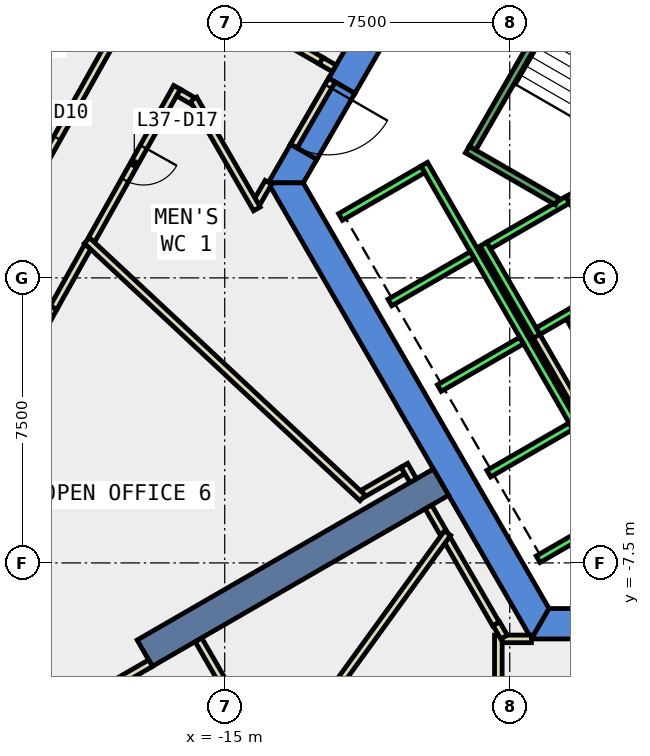
"""IFC4 building model, lengths in metres.
Left out: names, types, materials, properties, quantities, classifications, styles, units other than length and angle.
Written with IfcOpenShell. Run it as: python <this file> out.ifc"""

import sys

from ifc_helpers import new_model, si_unit, direction, frame, frame_2d, origin, place, context, subcontext, project, spatial, polyline, rectangle, outline, extrude, element, fill, save


model = new_model("IFC4")
c1 = context("Model", 3, precision=1e-05, world=origin(), true_north=direction((0.0, 1.0)))
c2 = subcontext(c1, "Body", "Model", "MODEL_VIEW")
j1 = project(units=[si_unit("LENGTHUNIT", "METRE"), si_unit("PLANEANGLEUNIT", "RADIAN")], contexts=[c1])
p1 = place(None, origin())
s1 = spatial("IfcSite", under=j1, at=p1, CompositionType="ELEMENT")
p2 = place(p1, origin())
s2 = spatial("IfcBuilding", under=s1, at=p2, CompositionType="ELEMENT")
p3 = place(p2, frame((0.0, 0.0, 167.6)))
s3 = spatial("IfcBuildingStorey", under=s2, at=p3, CompositionType="ELEMENT", Elevation=167.6)
p4 = place(p3, frame((0.0, 0.0, -0.4)))
e1 = element("IfcWall", 1, at=p4, inside=s3, PredefinedType="SHEAR", context=c2, shape_type="SweptSolid", body=[
    extrude(outline(polyline([(-12.267, 5.252), (-11.575, 4.852), (-6.466, 13.7), (-6.928, 14.5), (-12.267, 5.252)])), origin(), (0.0, 0.0, 1.0), 4.2),
])
p5 = place(p3, frame((0.0, 0.0, -0.4)))
e2 = element("IfcWall", 2, at=p5, inside=s3, PredefinedType="SHEAR", context=c2, shape_type="SweptSolid", body=[
    extrude(outline(polyline([(-12.575, 3.12), (-13.267, 3.52), (-13.856, 2.5), (-12.933, 2.5), (-12.575, 3.12)])), origin(), (0.0, 0.0, 1.0), 4.2),
])
p6 = place(p3, frame((0.0, 0.0, 3.6)))
e3 = element("IfcWall", 3, at=p6, inside=s3, PredefinedType="SHEAR", context=c2, shape_type="SweptSolid", body=[
    extrude(outline(polyline([(-13.267, 3.52), (-12.575, 3.12), (-11.575, 4.852), (-12.267, 5.252), (-13.267, 3.52)])), origin(), (0.0, 0.0, 1.0), 0.2),
])
p7 = place(p3, frame((0.0, 0.0, -0.4)))
e4 = element("IfcWall", 4, at=p7, inside=s3, PredefinedType="SHEAR", context=c2, shape_type="SweptSolid", body=[
    extrude(outline(polyline([(-13.856, 2.5), (-6.928, -9.5), (-6.466, -8.7), (-12.933, 2.5), (-13.856, 2.5)])), origin(), (0.0, 0.0, 1.0), 4.2),
])
p8 = place(p3, frame((0.0, 0.0, -0.4)))
e5 = element("IfcWall", 5, at=p8, inside=s3, PredefinedType="SHEAR", context=c2, shape_type="SweptSolid", body=[
    extrude(outline(polyline([(3.75, -9.5), (3.75, -8.7), (-6.466, -8.7), (-6.928, -9.5), (3.75, -9.5)])), origin(), (0.0, 0.0, 1.0), 4.2),
])
p9 = place(p3, frame((-9.31, -5.375, -0.4), z_axis=(0.0, 0.0, 1.0), x_axis=(-0.866017533419, -0.500013631625, 0.0)))
e6 = element("IfcWall", 6, at=p9, inside=s3, PredefinedType="SHEAR", context=c2, shape_type="SweptSolid", body=[
    extrude(rectangle(XDim=9.0, YDim=0.8, at=frame_2d((4.5, 0.0))), origin(), (0.0, 0.0, 1.0), 4.2),
])
p10 = place(p3, frame((-14.922, 7.131, 0.0), z_axis=(0.0, 0.0, 1.0), x_axis=(0.866124025492, -0.499829143273, 0.0)))
e7 = element("IfcWall", 7, at=p10, inside=s3, PredefinedType="PARTITIONING", context=c2, shape_type="SweptSolid", body=[
    extrude(rectangle(XDim=2.839, YDim=0.2, at=frame_2d((1.42, 0.0))), origin(), (0.0, 0.0, 1.0), 3.8),
])
p11 = place(p3, frame((-13.85, 2.514, 0.0), z_axis=(0.0, 0.0, 1.0), x_axis=(-0.500418219013, -0.865783810244, 0.0)))
e8 = element("IfcWall", 8, at=p11, inside=s3, PredefinedType="PARTITIONING", context=c2, shape_type="SweptSolid", body=[
    extrude(rectangle(XDim=0.607, YDim=0.2, at=frame_2d((0.304, 0.0))), origin(), (0.0, 0.0, 1.0), 3.8),
])
p12 = place(p3, frame((-14.154, 1.815, 0.0), z_axis=(0.0, 0.0, 1.0), x_axis=(-0.500038857296, 0.866002968352, 0.0)))
e9 = element("IfcWall", 9, at=p12, inside=s3, PredefinedType="PARTITIONING", context=c2, shape_type="SweptSolid", body=[
    extrude(rectangle(XDim=3.34, YDim=0.2, at=frame_2d((1.67, 0.0))), origin(), (0.0, 0.0, 1.0), 3.8),
])
p13 = place(p3, frame((-15.86, 4.671, 0.0), z_axis=(0.0, 0.0, 1.0), x_axis=(-0.866047486323, 0.49996174997, 0.0)))
e10 = element("IfcWall", 10, at=p13, inside=s3, PredefinedType="PARTITIONING", context=c2, shape_type="SweptSolid", body=[
    extrude(rectangle(XDim=0.412, YDim=0.2, at=frame_2d((0.206, 0.0))), origin(), (0.0, 0.0, 1.0), 3.8),
])
p14 = place(p3, frame((-16.255, 5.014, 0.0), z_axis=(0.0, 0.0, 1.0), x_axis=(-0.488988017817, -0.87229050117, 0.0)))
e11 = element("IfcWall", 11, at=p14, inside=s3, PredefinedType="PARTITIONING", context=c2, shape_type="SweptSolid", body=[
    extrude(rectangle(XDim=4.599, YDim=0.2, at=frame_2d((2.3, 0.0))), origin(), (0.0, 0.0, 1.0), 3.8),
])
p15 = place(p14, frame((1.8, 0.0, 0.0)))
e12 = element("IfcOpeningElement", 12, at=p15, cuts=e11, PredefinedType="OPENING", context=c2, shape_type="SweptSolid", body=[
    extrude(rectangle(XDim=1.0, YDim=2.1, at=frame_2d((0.5, 1.05))), frame((0.0, 0.11, 0.0), z_axis=(0.0, -1.0, 0.0), x_axis=(1.0, 0.0, 0.0)), (0.0, 0.0, 1.0), 0.22),
])
p16 = place(p3, frame((-18.602, 0.828, 0.0), z_axis=(0.0, 0.0, 1.0), x_axis=(-0.488969229043, -0.872301033502, 0.0)))
e13 = element("IfcWall", 13, at=p16, inside=s3, PredefinedType="PARTITIONING", context=c2, shape_type="SweptSolid", body=[
    extrude(rectangle(XDim=1.849, YDim=0.2, at=frame_2d((0.924, 0.0))), origin(), (0.0, 0.0, 1.0), 3.8),
])
p17 = place(p3, frame((-19.506, -0.785, 0.0), z_axis=(0.0, 0.0, 1.0), x_axis=(-0.477513909405, -0.878624189472, 0.0)))
e14 = element("IfcWall", 14, at=p17, inside=s3, PredefinedType="PARTITIONING", context=c2, shape_type="SweptSolid", body=[
    extrude(rectangle(XDim=6.956, YDim=0.2, at=frame_2d((3.478, 0.0))), origin(), (0.0, 0.0, 1.0), 3.8),
])
p18 = place(p17, frame((2.978, 0.0, 0.0)))
e15 = element("IfcOpeningElement", 15, at=p18, cuts=e14, PredefinedType="OPENING", context=c2, shape_type="SweptSolid", body=[
    extrude(rectangle(XDim=1.0, YDim=2.1, at=frame_2d((0.5, 1.05))), frame((0.0, 0.11, 0.0), z_axis=(0.0, -1.0, 0.0), x_axis=(1.0, 0.0, 0.0)), (0.0, 0.0, 1.0), 0.22),
])
p19 = place(p3, frame((-21.381, 0.165, 0.0), z_axis=(0.0, 0.0, 1.0), x_axis=(0.489014139272, 0.872275857509, 0.0)))
e16 = element("IfcWall", 16, at=p19, inside=s3, PredefinedType="PARTITIONING", context=c2, shape_type="SweptSolid", body=[
    extrude(rectangle(XDim=7.057, YDim=0.2, at=frame_2d((3.529, 0.0))), origin(), (0.0, 0.0, 1.0), 3.8),
])
p20 = place(p19, frame((3.029, 0.0, 0.0)))
e17 = element("IfcOpeningElement", 17, at=p20, cuts=e16, PredefinedType="OPENING", context=c2, shape_type="SweptSolid", body=[
    extrude(rectangle(XDim=1.0, YDim=2.1, at=frame_2d((0.5, 1.05))), frame((0.0, 0.11, 0.0), z_axis=(0.0, -1.0, 0.0), x_axis=(1.0, 0.0, 0.0)), (0.0, 0.0, 1.0), 0.22),
])
p21 = place(p3, frame((-5.126, -2.422, 0.0), z_axis=(0.0, 0.0, 1.0), x_axis=(-0.500062241894, 0.865989465428, 0.0)))
e18 = element("IfcWall", 18, at=p21, inside=s3, PredefinedType="PARTITIONING", context=c2, shape_type="SweptSolid", body=[
    extrude(rectangle(XDim=1.7, YDim=0.2, at=frame_2d((0.85, 0.0))), origin(), (0.0, 0.0, 1.0), 3.8),
])
p22 = place(p3, frame((-5.492, -3.788, 0.0), z_axis=(0.0, 0.0, 1.0), x_axis=(-0.500008949224, 0.866020236886, 0.0)))
e19 = element("IfcWall", 19, at=p22, inside=s3, PredefinedType="PARTITIONING", context=c2, shape_type="SweptSolid", body=[
    extrude(rectangle(XDim=2.68, YDim=0.2, at=frame_2d((1.34, 0.0))), origin(), (0.0, 0.0, 1.0), 3.8),
])
p23 = place(p3, frame((-7.722, -9.499, 0.0), z_axis=(0.0, 0.0, 1.0), x_axis=(1.0, 0.0, 0.0)))
e20 = element("IfcWall", 20, at=p23, inside=s3, PredefinedType="PARTITIONING", context=c2, shape_type="SweptSolid", body=[
    extrude(rectangle(XDim=0.793, YDim=0.2, at=frame_2d((0.396, 0.0))), origin(), (0.0, 0.0, 1.0), 3.8),
])
p24 = place(p3, frame((-7.8, -17.171, 0.0), z_axis=(0.0, 0.0, 1.0), x_axis=(0.0, 1.0, 0.0)))
e21 = element("IfcWall", 21, at=p24, inside=s3, PredefinedType="PARTITIONING", context=c2, shape_type="SweptSolid", body=[
    extrude(rectangle(XDim=7.772, YDim=0.2, at=frame_2d((3.886, 0.0))), origin(), (0.0, 0.0, 1.0), 3.8),
])
p25 = place(p24, frame((3.386, 0.0, 0.0)))
e22 = element("IfcOpeningElement", 22, at=p25, cuts=e21, PredefinedType="OPENING", context=c2, shape_type="SweptSolid", body=[
    extrude(rectangle(XDim=1.0, YDim=2.1, at=frame_2d((0.5, 1.05))), frame((0.0, 0.11, 0.0), z_axis=(0.0, -1.0, 0.0), x_axis=(1.0, 0.0, 0.0)), (0.0, 0.0, 1.0), 0.22),
])
p26 = place(p3, frame((-7.862, -9.107, 0.0), z_axis=(0.0, 0.0, 1.0), x_axis=(-0.499994038704, 0.866028845513, 0.0)))
e23 = element("IfcWall", 23, at=p26, inside=s3, PredefinedType="PARTITIONING", context=c2, shape_type="SweptSolid", body=[
    extrude(rectangle(XDim=2.568, YDim=0.2, at=frame_2d((1.284, 0.0))), origin(), (0.0, 0.0, 1.0), 3.8),
])
p27 = place(p3, frame((-7.65, -9.451, 0.0), z_axis=(0.0, 0.0, 1.0), x_axis=(-0.500297731093, 0.865853440406, 0.0)))
e24 = element("IfcWall", 24, at=p27, inside=s3, PredefinedType="PARTITIONING", context=c2, shape_type="SweptSolid", body=[
    extrude(rectangle(XDim=0.404, YDim=0.2, at=frame_2d((0.202, 0.0))), origin(), (0.0, 0.0, 1.0), 3.8),
])
p28 = place(p3, frame((-9.246, -6.71, 0.0), z_axis=(0.0, 0.0, 1.0), x_axis=(-0.499570510076, 0.86627322795, 0.0)))
e25 = element("IfcWall", 25, at=p28, inside=s3, PredefinedType="PARTITIONING", context=c2, shape_type="SweptSolid", body=[
    extrude(rectangle(XDim=0.788, YDim=0.2, at=frame_2d((0.394, 0.0))), origin(), (0.0, 0.0, 1.0), 3.8),
])
p29 = place(p3, frame((-10.31, -5.066, 0.0), z_axis=(0.0, 0.0, 1.0), x_axis=(-0.865587329375, -0.500758000661, 0.0)))
e26 = element("IfcWall", 26, at=p29, inside=s3, PredefinedType="PARTITIONING", context=c2, shape_type="SweptSolid", body=[
    extrude(rectangle(XDim=1.21, YDim=0.2, at=frame_2d((0.605, 0.0))), origin(), (0.0, 0.0, 1.0), 3.8),
])
p30 = place(p3, frame((-11.372, -5.79, 0.0), z_axis=(0.0, 0.0, 1.0), x_axis=(-0.730922728623, 0.682460229451, 0.0)))
e27 = element("IfcWall", 27, at=p30, inside=s3, PredefinedType="PARTITIONING", context=c2, shape_type="SweptSolid", body=[
    extrude(rectangle(XDim=9.924, YDim=0.2, at=frame_2d((4.962, 0.0))), origin(), (0.0, 0.0, 1.0), 3.8),
])
p31 = place(p3, frame((-13.744, -13.076, 0.0), z_axis=(0.0, 0.0, 1.0), x_axis=(0.586577314901, 0.809893235953, 0.0)))
e28 = element("IfcWall", 28, at=p31, inside=s3, PredefinedType="PARTITIONING", context=c2, shape_type="SweptSolid", body=[
    extrude(rectangle(XDim=7.854, YDim=0.2, at=frame_2d((3.927, 0.0))), origin(), (0.0, 0.0, 1.0), 3.8),
])
p32 = place(p3, frame((-13.736, -12.909, 0.0), z_axis=(0.0, 0.0, 1.0), x_axis=(-0.49990810406, 0.866078453429, 0.0)))
e29 = element("IfcWall", 29, at=p32, inside=s3, PredefinedType="PARTITIONING", context=c2, shape_type="SweptSolid", body=[
    extrude(rectangle(XDim=3.908, YDim=0.2, at=frame_2d((1.954, 0.0))), origin(), (0.0, 0.0, 1.0), 3.8),
])
p33 = place(p3, frame((-16.952, -10.138, 0.0), z_axis=(0.0, 0.0, 1.0), x_axis=(-0.866054992606, -0.499948747156, 0.0)))
e30 = element("IfcWall", 30, at=p33, inside=s3, PredefinedType="PARTITIONING", context=c2, shape_type="SweptSolid", body=[
    extrude(rectangle(XDim=4.701, YDim=0.2, at=frame_2d((2.35, 0.0))), origin(), (0.0, 0.0, 1.0), 3.8),
])
p34 = place(p3, frame((-12.18, 5.202, 0.0), z_axis=(0.0, 0.0, 1.0), x_axis=(-0.50002537861, -0.866010750942, 0.0)))
e31 = element("IfcWall", 31, at=p34, inside=s3, PredefinedType="PARTITIONING", context=c2, shape_type="SweptSolid", body=[
    extrude(rectangle(XDim=2.0, YDim=0.2, at=frame_2d((1.0, 0.0))), origin(), (0.0, 0.0, 1.0), 2.4),
])
p35 = place(p34, frame((0.19, 0.0, 0.0)))
e32 = element("IfcOpeningElement", 32, at=p35, cuts=e31, PredefinedType="OPENING", context=c2, shape_type="SweptSolid", body=[
    extrude(rectangle(XDim=1.8, YDim=2.1, at=frame_2d((0.9, 1.05))), frame((0.0, 0.11, 0.0), z_axis=(0.0, -1.0, 0.0), x_axis=(1.0, 0.0, 0.0)), (0.0, 0.0, 1.0), 0.22),
])
p36 = place(p3, frame((-10.04, -5.334, 0.0), z_axis=(0.0, 0.0, 1.0), x_axis=(-0.499405191234, 0.86636854454, 0.0)))
e33 = element("IfcWall", 33, at=p36, inside=s3, PredefinedType="PARTITIONING", context=c2, shape_type="SweptSolid", body=[
    extrude(rectangle(XDim=0.466, YDim=0.2, at=frame_2d((0.233, 0.0))), origin(), (0.0, 0.0, 1.0), 3.8),
])
p37 = place(p3, frame((-12.463, 5.712, 0.0), z_axis=(0.0, 0.0, 1.0), x_axis=(0.865788603161, -0.500409926597, 0.0)))
e34 = element("IfcWall", 34, at=p37, inside=s3, PredefinedType="PARTITIONING", context=c2, shape_type="SweptSolid", body=[
    extrude(rectangle(XDim=0.4, YDim=0.2, at=frame_2d((0.2, 0.0))), origin(), (0.0, 0.0, 1.0), 2.4),
])
p38 = place(p3, frame((-5.94, 2.188, 0.0), z_axis=(0.0, 0.0, 1.0), x_axis=(0.49994636267, -0.866056369097, 0.0)))
e35 = element("IfcWall", 35, at=p38, inside=s3, PredefinedType="STANDARD", context=c2, shape_type="SweptSolid", body=[
    extrude(rectangle(XDim=2.8, YDim=0.2, at=frame_2d((1.4, 0.0))), origin(), (0.0, 0.0, 1.0), 3.8),
])
p39 = place(p38, frame((1.225, 0.0, 0.0)))
e36 = element("IfcOpeningElement", 36, at=p39, cuts=e35, PredefinedType="OPENING", context=c2, shape_type="SweptSolid", body=[
    extrude(rectangle(XDim=1.1, YDim=2.1, at=frame_2d((0.55, 1.05))), frame((0.0, 0.11, 0.0), z_axis=(0.0, -1.0, 0.0), x_axis=(1.0, 0.0, 0.0)), (0.0, 0.0, 1.0), 0.22),
])
p40 = place(p3, frame((-8.192, 0.888, 0.0), z_axis=(0.0, 0.0, 1.0), x_axis=(0.49994636267, -0.866056369097, 0.0)))
e37 = element("IfcWall", 37, at=p40, inside=s3, PredefinedType="STANDARD", context=c2, shape_type="SweptSolid", body=[
    extrude(rectangle(XDim=2.8, YDim=0.2, at=frame_2d((1.4, 0.0))), origin(), (0.0, 0.0, 1.0), 3.8),
])
for number, where, z_axis, x_axis in (
    (38, (-5.977, 2.052, 0.0), (0.0, 0.0, 1.0), (-0.866, -0.5, 0.0)),
    (39, (-4.677, -0.2, 0.0), (0.0, 0.0, 1.0), (-0.866, -0.5, 0.0)),
):
    element("IfcWall", number, at=place(p3, frame(where, z_axis=z_axis, x_axis=x_axis)), inside=s3, PredefinedType="STANDARD", context=c2, shape_type="SweptSolid", body=[
        extrude(rectangle(XDim=2.399, YDim=0.2, at=frame_2d((1.2, 0.0))), origin(), (0.0, 0.0, 1.0), 3.8),
    ])
p41 = place(p3, frame((-9.751, 2.99, 0.0), z_axis=(0.0, 0.0, 1.0), x_axis=(0.50000090737, -0.866024879913, 0.0)))
e40 = element("IfcWall", 40, at=p41, inside=s3, PredefinedType="STANDARD", context=c2, shape_type="SweptSolid", body=[
    extrude(rectangle(XDim=10.6, YDim=0.2, at=frame_2d((5.3, 0.0))), origin(), (0.0, 0.0, 1.0), 3.8),
])
p42 = place(p3, frame((-9.788, 2.853, 0.0), z_axis=(0.0, 0.0, 1.0), x_axis=(-0.865998541277, -0.500046524342, 0.0)))
e41 = element("IfcWall", 41, at=p42, inside=s3, PredefinedType="STANDARD", context=c2, shape_type="SweptSolid", body=[
    extrude(rectangle(XDim=2.5, YDim=0.2, at=frame_2d((1.25, 0.0))), origin(), (0.0, 0.0, 1.0), 3.8),
])
for number, where, z_axis, x_axis in (
    (42, (-8.488, 0.602, 0.0), (0.0, 0.0, 1.0), (-0.866, -0.5, 0.0)),
    (43, (-7.188, -1.65, 0.0), (0.0, 0.0, 1.0), (-0.866, -0.5, 0.0)),
    (44, (-5.888, -3.902, 0.0), (0.0, 0.0, 1.0), (-0.866, -0.5, 0.0)),
    (45, (-4.588, -6.153, 0.0), (0.0, 0.0, 1.0), (-0.866, -0.5, 0.0)),
):
    element("IfcWall", number, at=place(p3, frame(where, z_axis=z_axis, x_axis=x_axis)), inside=s3, PredefinedType="STANDARD", context=c2, shape_type="SweptSolid", body=[
        extrude(rectangle(XDim=2.5, YDim=0.2, at=frame_2d((1.25, 0.0))), origin(), (0.0, 0.0, 1.0), 3.8),
    ])
p43 = place(p3, frame((-6.25, 2.01, 0.0), z_axis=(0.0, 0.0, 1.0), x_axis=(-0.86611865017, 0.499838457731, 0.0)))
e46 = element("IfcWall", 46, at=p43, inside=s3, PredefinedType="STANDARD", context=c2, shape_type="SweptSolid", body=[
    extrude(rectangle(XDim=2.733, YDim=0.2, at=frame_2d((1.366, 0.0))), origin(), (0.0, 0.0, 1.0), 3.8),
])
p44 = place(p3, frame((-5.03, 9.388, 0.0), z_axis=(0.0, 0.0, 1.0), x_axis=(-0.499978703459, -0.866037698999, 0.0)))
e47 = element("IfcWall", 47, at=p44, inside=s3, PredefinedType="STANDARD", context=c2, shape_type="SweptSolid", body=[
    extrude(rectangle(XDim=6.9, YDim=0.2, at=frame_2d((3.45, 0.0))), origin(), (0.0, 0.0, 1.0), 3.8),
])
p45 = place(p20, origin())
e48 = element("IfcDoor", 48, at=p45, inside=s3, OperationType="SINGLE_SWING_RIGHT", PredefinedType="DOOR", context=c2, shape_type="SweptSolid", body=[
    extrude(rectangle(XDim=1.0, YDim=2.1, at=frame_2d((0.5, 1.05))), frame((0.0, 0.025, 0.0), z_axis=(0.0, -1.0, 0.0), x_axis=(1.0, 0.0, 0.0)), (0.0, 0.0, 1.0), 0.05),
])
fill(e17, e48)
p46 = place(p15, origin())
e49 = element("IfcDoor", 49, at=p46, inside=s3, OperationType="SINGLE_SWING_LEFT", PredefinedType="DOOR", context=c2, shape_type="SweptSolid", body=[
    extrude(rectangle(XDim=1.0, YDim=2.1, at=frame_2d((0.5, 1.05))), frame((0.0, 0.025, 0.0), z_axis=(0.0, -1.0, 0.0), x_axis=(1.0, 0.0, 0.0)), (0.0, 0.0, 1.0), 0.05),
])
fill(e12, e49)
p47 = place(p35, origin())
e50 = element("IfcDoor", 50, at=p47, inside=s3, OperationType="DOUBLE_DOOR_SINGLE_SWING", PredefinedType="DOOR", context=c2, shape_type="SweptSolid", body=[
    extrude(rectangle(XDim=1.8, YDim=2.1, at=frame_2d((0.9, 1.05))), frame((0.0, 0.025, 0.0), z_axis=(0.0, -1.0, 0.0), x_axis=(1.0, 0.0, 0.0)), (0.0, 0.0, 1.0), 0.05),
])
fill(e32, e50)
save(model, sys.argv[1])
